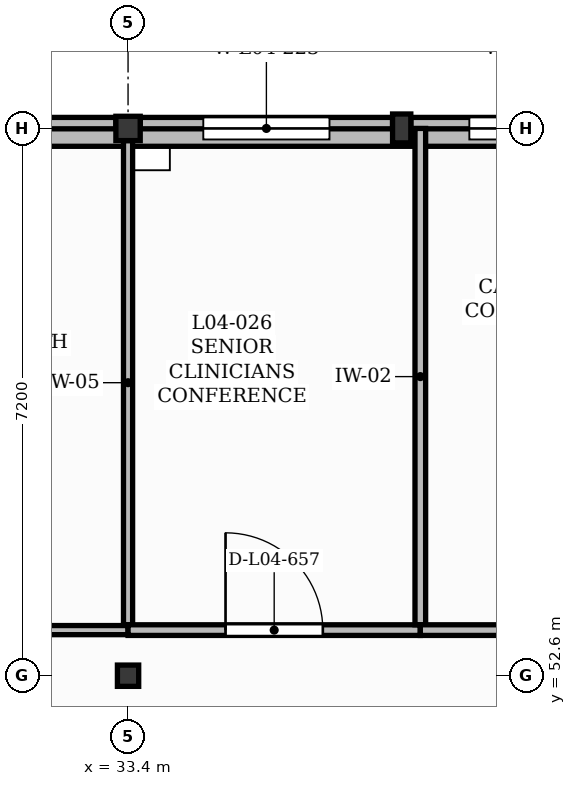
"""IFC4 building model, lengths in metres.
Left out: names, types, materials, properties, quantities, classifications, styles, units other than length and angle.
Written with IfcOpenShell. Run it as: python <this file> out.ifc"""

import sys

from ifc_helpers import new_model, si_unit, direction, frame, frame_2d, origin, origin_2d, place, context, subcontext, project, spatial, polyline, rectangle, outline, extrude, element, fill, save


model = new_model("IFC4")
c1 = context("Model", 3, precision=1e-05, world=origin(), true_north=direction((0.0, 1.0)))
c2 = subcontext(c1, "Body", "Model", "MODEL_VIEW")
j1 = project(units=[si_unit("LENGTHUNIT", "METRE"), si_unit("PLANEANGLEUNIT", "RADIAN")], contexts=[c1])
p1 = place(None, origin())
s1 = spatial("IfcSite", under=j1, at=p1, CompositionType="ELEMENT")
p2 = place(p1, origin())
s2 = spatial("IfcBuilding", under=s1, at=p2, CompositionType="ELEMENT")
p3 = place(p2, frame((0.0, 0.0, 17.4)))
s3 = spatial("IfcBuildingStorey", under=s2, at=p3, CompositionType="ELEMENT", Elevation=17.4)
p4 = place(p3, frame((33.4, 52.6, 0.0), z_axis=(0.0, 0.0, 1.0), x_axis=(1.0, 0.0, 0.0)))
e1 = element("IfcColumn", 1, at=p4, inside=s3, PredefinedType="COLUMN", context=c2, shape_type="SweptSolid", body=[
    extrude(rectangle(XDim=0.28, YDim=0.28, at=origin_2d()), origin(), (0.0, 0.0, 1.0), 3.95),
])
p5 = place(p3, frame((33.4, 59.8, 0.0), z_axis=(0.0, 0.0, 1.0), x_axis=(1.0, 0.0, 0.0)))
e2 = element("IfcColumn", 2, at=p5, inside=s3, PredefinedType="COLUMN", context=c2, shape_type="SweptSolid", body=[
    extrude(rectangle(XDim=0.32, YDim=0.32, at=origin_2d()), origin(), (0.0, 0.0, 1.0), 3.95),
])
p6 = place(p3, frame((37.0, 59.8, 0.0), z_axis=(0.0, 0.0, 1.0), x_axis=(1.0, 0.0, 0.0)))
e3 = element("IfcColumn", 3, at=p6, inside=s3, PredefinedType="PILASTER", context=c2, shape_type="SweptSolid", body=[
    extrude(rectangle(XDim=0.24, YDim=0.38, at=origin_2d()), origin(), (0.0, 0.0, 1.0), 3.95),
])
p7 = place(p3, frame((26.34, 59.8, 0.0), z_axis=(0.0, 0.0, 1.0), x_axis=(1.0, 0.0, 0.0)))
e4 = element("IfcWall", 4, at=p7, inside=s3, PredefinedType="SOLIDWALL", context=c2, shape_type="SweptSolid", body=[
    extrude(rectangle(XDim=6.9, YDim=0.29, at=frame_2d((3.45, 0.0))), origin(), (0.0, 0.0, 1.0), 3.49),
])
p8 = place(p7, frame((0.69, 0.0, 1.35)))
e5 = element("IfcOpeningElement", 5, at=p8, cuts=e4, PredefinedType="OPENING", context=c2, shape_type="SweptSolid", body=[
    extrude(rectangle(XDim=1.45, YDim=1.4, at=frame_2d((0.725, 0.7))), frame((0.0, 0.155, 0.0), z_axis=(0.0, -1.0, 0.0), x_axis=(1.0, 0.0, 0.0)), (0.0, 0.0, 1.0), 0.31),
])
p9 = place(p7, frame((4.12, 0.0, 1.35)))
e6 = element("IfcOpeningElement", 6, at=p9, cuts=e4, PredefinedType="OPENING", context=c2, shape_type="SweptSolid", body=[
    extrude(rectangle(XDim=1.25, YDim=1.4, at=frame_2d((0.625, 0.7))), frame((0.0, 0.155, 0.0), z_axis=(0.0, -1.0, 0.0), x_axis=(1.0, 0.0, 0.0)), (0.0, 0.0, 1.0), 0.31),
])
p10 = place(p3, frame((33.56, 59.8, 0.0), z_axis=(0.0, 0.0, 1.0), x_axis=(1.0, 0.0, 0.0)))
e7 = element("IfcWall", 7, at=p10, inside=s3, PredefinedType="SOLIDWALL", context=c2, shape_type="SweptSolid", body=[
    extrude(rectangle(XDim=3.32, YDim=0.29, at=frame_2d((1.66, 0.0))), origin(), (0.0, 0.0, 1.0), 3.49),
])
p11 = place(p10, frame((0.83, 0.0, 1.0)))
e8 = element("IfcOpeningElement", 8, at=p11, cuts=e7, PredefinedType="OPENING", context=c2, shape_type="SweptSolid", body=[
    extrude(rectangle(XDim=1.66, YDim=1.8, at=frame_2d((0.83, 0.9))), frame((0.0, 0.155, 0.0), z_axis=(0.0, -1.0, 0.0), x_axis=(1.0, 0.0, 0.0)), (0.0, 0.0, 1.0), 0.31),
])
p12 = place(p3, frame((37.12, 59.8, 0.0), z_axis=(0.0, 0.0, 1.0), x_axis=(1.0, 0.0, 0.0)))
e9 = element("IfcWall", 9, at=p12, inside=s3, PredefinedType="SOLIDWALL", context=c2, shape_type="SweptSolid", body=[
    extrude(rectangle(XDim=3.34, YDim=0.29, at=frame_2d((1.67, 0.0))), origin(), (0.0, 0.0, 1.0), 3.49),
])
p13 = place(p12, frame((0.77, 0.0, 1.0)))
e10 = element("IfcOpeningElement", 10, at=p13, cuts=e9, PredefinedType="OPENING", context=c2, shape_type="SweptSolid", body=[
    extrude(rectangle(XDim=1.8, YDim=1.8, at=frame_2d((0.9, 0.9))), frame((0.0, 0.155, 0.0), z_axis=(0.0, -1.0, 0.0), x_axis=(1.0, 0.0, 0.0)), (0.0, 0.0, 1.0), 0.31),
])
p14 = place(p3, frame((4.6, 59.68, 4.2), z_axis=(0.0, 0.0, 1.0), x_axis=(1.0, 0.0, 0.0)))
e11 = element("IfcWall", 11, at=p14, inside=s3, PredefinedType="PARAPET", context=c2, shape_type="SweptSolid", body=[
    extrude(outline(polyline([(0.0, 0.0), (50.4, 0.0), (50.4, 0.65), (39.312, 0.925), (39.312, 0.65), (32.256, 1.2), (32.256, 0.925), (18.144, 1.2), (18.144, 0.925), (11.088, 0.925), (11.088, 0.65), (0.0, 0.65), (0.0, 0.0)])), frame((0.0, 0.115, 0.0), z_axis=(0.0, -1.0, 0.0), x_axis=(1.0, 0.0, 0.0)), (0.0, 0.0, 1.0), 0.23),
])
p15 = place(p3, frame((29.05, 53.2, 0.0), z_axis=(0.0, 0.0, 1.0), x_axis=(1.0, 0.0, 0.0)))
e12 = element("IfcWall", 12, at=p15, inside=s3, PredefinedType="PLUMBINGWALL", context=c2, shape_type="SweptSolid", body=[
    extrude(rectangle(XDim=4.35, YDim=0.12, at=frame_2d((2.175, 0.0))), origin(), (0.0, 0.0, 1.0), 3.93),
])
p16 = place(p15, frame((1.725, 0.0, 0.0)))
e13 = element("IfcOpeningElement", 13, at=p16, cuts=e12, PredefinedType="OPENING", context=c2, shape_type="SweptSolid", body=[
    extrude(rectangle(XDim=0.9, YDim=2.1, at=frame_2d((0.45, 1.05))), frame((0.0, 0.07, 0.0), z_axis=(0.0, -1.0, 0.0), x_axis=(1.0, 0.0, 0.0)), (0.0, 0.0, 1.0), 0.14),
])
p17 = place(p3, frame((33.4, 53.27, 0.0), z_axis=(0.0, 0.0, 1.0), x_axis=(0.0, 1.0, 0.0)))
e14 = element("IfcWall", 14, at=p17, inside=s3, PredefinedType="PLUMBINGWALL", context=c2, shape_type="SweptSolid", body=[
    extrude(rectangle(XDim=6.37, YDim=0.12, at=frame_2d((3.185, 0.0))), origin(), (0.0, 0.0, 1.0), 3.49),
])
p18 = place(p3, frame((33.4, 53.2, 0.0), z_axis=(0.0, 0.0, 1.0), x_axis=(1.0, 0.0, 0.0)))
e15 = element("IfcWall", 15, at=p18, inside=s3, PredefinedType="PARTITIONING", context=c2, shape_type="SweptSolid", body=[
    extrude(rectangle(XDim=3.845, YDim=0.14, at=frame_2d((1.923, 0.0))), origin(), (0.0, 0.0, 1.0), 3.93),
])
p19 = place(p18, frame((1.282, 0.0, 0.0)))
e16 = element("IfcOpeningElement", 16, at=p19, cuts=e15, PredefinedType="OPENING", context=c2, shape_type="SweptSolid", body=[
    extrude(rectangle(XDim=1.28, YDim=2.2, at=frame_2d((0.64, 1.1))), frame((0.0, 0.08, 0.0), z_axis=(0.0, -1.0, 0.0), x_axis=(1.0, 0.0, 0.0)), (0.0, 0.0, 1.0), 0.16),
])
p20 = place(p3, frame((37.245, 53.27, 0.0), z_axis=(0.0, 0.0, 1.0), x_axis=(0.0, 1.0, 0.0)))
e17 = element("IfcWall", 17, at=p20, inside=s3, PredefinedType="PARTITIONING", context=c2, shape_type="SweptSolid", body=[
    extrude(rectangle(XDim=6.53, YDim=0.14, at=frame_2d((3.265, 0.0))), origin(), (0.0, 0.0, 1.0), 3.93),
])
p21 = place(p3, frame((37.245, 53.2, 0.0), z_axis=(0.0, 0.0, 1.0), x_axis=(1.0, 0.0, 0.0)))
e18 = element("IfcWall", 18, at=p21, inside=s3, PredefinedType="PARTITIONING", context=c2, shape_type="SweptSolid", body=[
    extrude(rectangle(XDim=3.355, YDim=0.14, at=frame_2d((1.677, 0.0))), origin(), (0.0, 0.0, 1.0), 3.93),
])
p22 = place(p21, frame((1.228, 0.0, 0.0)))
e19 = element("IfcOpeningElement", 19, at=p22, cuts=e18, PredefinedType="OPENING", context=c2, shape_type="SweptSolid", body=[
    extrude(rectangle(XDim=0.9, YDim=2.1, at=frame_2d((0.45, 1.05))), frame((0.0, 0.08, 0.0), z_axis=(0.0, -1.0, 0.0), x_axis=(1.0, 0.0, 0.0)), (0.0, 0.0, 1.0), 0.16),
])
p23 = place(p11, origin())
e20 = element("IfcWindow", 20, at=p23, inside=s3, PartitioningType="DOUBLE_PANEL_VERTICAL", PredefinedType="WINDOW", context=c2, shape_type="SweptSolid", body=[
    extrude(rectangle(XDim=1.66, YDim=1.8, at=frame_2d((0.83, 0.9))), frame((0.0, 0.03, 0.0), z_axis=(0.0, -1.0, 0.0), x_axis=(1.0, 0.0, 0.0)), (0.0, 0.0, 1.0), 0.06),
])
fill(e8, e20)
p24 = place(p13, origin())
e21 = element("IfcWindow", 21, at=p24, inside=s3, PartitioningType="DOUBLE_PANEL_VERTICAL", PredefinedType="WINDOW", context=c2, shape_type="SweptSolid", body=[
    extrude(rectangle(XDim=1.8, YDim=1.8, at=frame_2d((0.9, 0.9))), frame((0.0, 0.03, 0.0), z_axis=(0.0, -1.0, 0.0), x_axis=(1.0, 0.0, 0.0)), (0.0, 0.0, 1.0), 0.06),
])
fill(e10, e21)
p25 = place(p19, origin())
e22 = element("IfcDoor", 22, at=p25, inside=s3, OperationType="SINGLE_SWING_LEFT", PredefinedType="DOOR", context=c2, shape_type="SweptSolid", body=[
    extrude(rectangle(XDim=1.28, YDim=2.2, at=frame_2d((0.64, 1.1))), frame((0.0, 0.025, 0.0), z_axis=(0.0, -1.0, 0.0), x_axis=(1.0, 0.0, 0.0)), (0.0, 0.0, 1.0), 0.05),
])
fill(e16, e22)
save(model, sys.argv[1])
